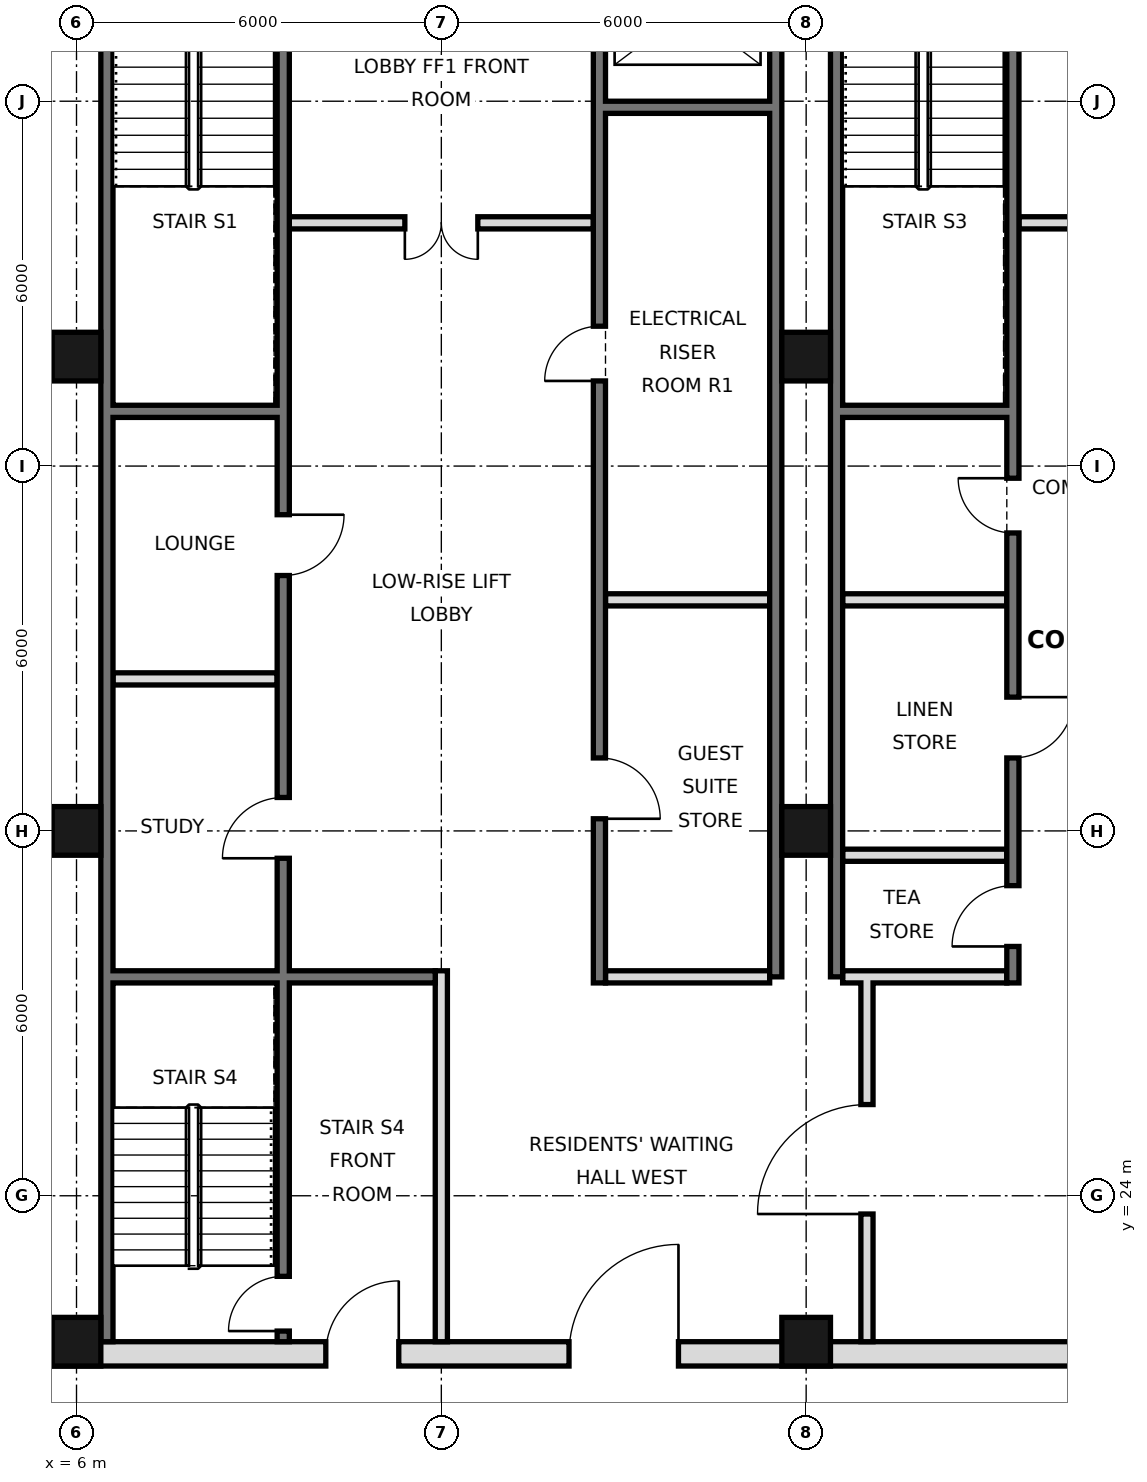
"""IFC4 building model, lengths in metres.
Left out: names, types, materials, properties, quantities, classifications, styles, units other than length and angle.
Written with IfcOpenShell. Run it as: python <this file> out.ifc"""

import sys

from ifc_helpers import new_model, si_unit, direction, frame, frame_2d, origin, origin_2d, place, context, subcontext, project, spatial, rectangle, hollow_rectangle, extrude, element, fill, save


model = new_model("IFC4")
c1 = context("Model", 3, precision=1e-05, world=origin(), true_north=direction((0.0, 1.0)))
c2 = subcontext(c1, "Body", "Model", "MODEL_VIEW")
j1 = project(units=[si_unit("LENGTHUNIT", "METRE"), si_unit("PLANEANGLEUNIT", "RADIAN")], contexts=[c1])
p1 = place(None, origin())
s1 = spatial("IfcSite", under=j1, at=p1, CompositionType="ELEMENT")
p2 = place(p1, origin())
s2 = spatial("IfcBuilding", under=s1, at=p2, CompositionType="ELEMENT")
p3 = place(p2, frame((0.0, 0.0, 319.6)))
s3 = spatial("IfcBuildingStorey", under=s2, at=p3, CompositionType="ELEMENT", Elevation=319.6)
for number, where, z_axis, x_axis in (
    (1, (6.0, 21.6, 0.0), (0.0, 0.0, 1.0), (1.0, 0.0, 0.0)),
    (2, (6.0, 30.0, 0.0), (0.0, 0.0, 1.0), (1.0, 0.0, 0.0)),
    (3, (6.0, 37.8, 0.0), (0.0, 0.0, 1.0), (1.0, 0.0, 0.0)),
    (4, (18.0, 21.6, 0.0), (0.0, 0.0, 1.0), (1.0, 0.0, 0.0)),
    (5, (18.0, 30.0, 0.0), (0.0, 0.0, 1.0), (1.0, 0.0, 0.0)),
    (6, (18.0, 37.8, 0.0), (0.0, 0.0, 1.0), (1.0, 0.0, 0.0)),
):
    element("IfcColumn", number, at=place(p3, frame(where, z_axis=z_axis, x_axis=x_axis)), inside=s3, PredefinedType="COLUMN", context=c2, shape_type="SweptSolid", body=[
        extrude(hollow_rectangle(XDim=0.8, YDim=0.8, WallThickness=0.025, at=origin_2d()), origin(), (0.0, 0.0, 1.0), 3.6),
    ])
p4 = place(p3, frame((6.5, 21.6, 0.0), z_axis=(0.0, 0.0, 1.0), x_axis=(0.0, 1.0, 0.0)))
e7 = element("IfcWall", 7, at=p4, inside=s3, PredefinedType="SOLIDWALL", context=c2, shape_type="SweptSolid", body=[
    extrude(rectangle(XDim=23.5, YDim=0.2, at=frame_2d((11.75, 0.0))), origin(), (0.0, 0.0, 1.0), 3.42),
])
for number, where, z_axis, x_axis in (
    (8, (17.5, 27.6, 0.0), (0.0, 0.0, 1.0), (0.0, 1.0, 0.0)),
    (9, (18.5, 27.6, 0.0), (0.0, 0.0, 1.0), (0.0, 1.0, 0.0)),
):
    element("IfcWall", number, at=place(p3, frame(where, z_axis=z_axis, x_axis=x_axis)), inside=s3, PredefinedType="SOLIDWALL", context=c2, shape_type="SweptSolid", body=[
        extrude(rectangle(XDim=17.5, YDim=0.2, at=frame_2d((8.75, 0.0))), origin(), (0.0, 0.0, 1.0), 3.42),
    ])
p5 = place(p3, frame((5.6, 21.4, 0.0), z_axis=(0.0, 0.0, 1.0), x_axis=(1.0, 0.0, 0.0)))
e10 = element("IfcWall", 10, at=p5, inside=s3, PredefinedType="SOLIDWALL", context=c2, shape_type="SweptSolid", body=[
    extrude(rectangle(XDim=36.8, YDim=0.4, at=frame_2d((18.4, 0.0))), origin(), (0.0, 0.0, 1.0), 3.42),
])
p6 = place(p5, frame((8.5, 0.0, 0.0)))
e11 = element("IfcOpeningElement", 11, at=p6, cuts=e10, PredefinedType="OPENING", context=c2, shape_type="SweptSolid", body=[
    extrude(rectangle(XDim=1.8, YDim=2.1, at=frame_2d((0.9, 1.05))), frame((0.0, 0.21, 0.0), z_axis=(0.0, -1.0, 0.0), x_axis=(1.0, 0.0, 0.0)), (0.0, 0.0, 1.0), 0.42),
])
p7 = place(p5, frame((17.5, 0.0, 0.0)))
e12 = element("IfcOpeningElement", 12, at=p7, cuts=e10, PredefinedType="OPENING", context=c2, shape_type="SweptSolid", body=[
    extrude(rectangle(XDim=1.8, YDim=2.1, at=frame_2d((0.9, 1.05))), frame((0.0, 0.21, 0.0), z_axis=(0.0, -1.0, 0.0), x_axis=(1.0, 0.0, 0.0)), (0.0, 0.0, 1.0), 0.42),
])
p8 = place(p5, frame((26.5, 0.0, 0.0)))
e13 = element("IfcOpeningElement", 13, at=p8, cuts=e10, PredefinedType="OPENING", context=c2, shape_type="SweptSolid", body=[
    extrude(rectangle(XDim=1.8, YDim=2.1, at=frame_2d((0.9, 1.05))), frame((0.0, 0.21, 0.0), z_axis=(0.0, -1.0, 0.0), x_axis=(1.0, 0.0, 0.0)), (0.0, 0.0, 1.0), 0.42),
])
p9 = place(p5, frame((4.5, 0.0, 0.0)))
e14 = element("IfcOpeningElement", 14, at=p9, cuts=e10, PredefinedType="OPENING", context=c2, shape_type="SweptSolid", body=[
    extrude(rectangle(XDim=1.2, YDim=2.1, at=frame_2d((0.6, 1.05))), frame((0.0, 0.21, 0.0), z_axis=(0.0, -1.0, 0.0), x_axis=(1.0, 0.0, 0.0)), (0.0, 0.0, 1.0), 0.42),
])
p10 = place(p5, frame((31.1, 0.0, 0.0)))
e15 = element("IfcOpeningElement", 15, at=p10, cuts=e10, PredefinedType="OPENING", context=c2, shape_type="SweptSolid", body=[
    extrude(rectangle(XDim=1.2, YDim=2.1, at=frame_2d((0.6, 1.05))), frame((0.0, 0.21, 0.0), z_axis=(0.0, -1.0, 0.0), x_axis=(1.0, 0.0, 0.0)), (0.0, 0.0, 1.0), 0.42),
])
p11 = place(p3, frame((19.0, 21.6, 0.0), z_axis=(0.0, 0.0, 1.0), x_axis=(0.0, 1.0, 0.0)))
e16 = element("IfcWall", 16, at=p11, inside=s3, PredefinedType="PARTITIONING", context=c2, shape_type="SweptSolid", body=[
    extrude(rectangle(XDim=6.0, YDim=0.2, at=frame_2d((3.0, 0.0))), origin(), (0.0, 0.0, 1.0), 3.42),
])
p12 = place(p11, frame((2.1, 0.0, 0.0)))
e17 = element("IfcOpeningElement", 17, at=p12, cuts=e16, PredefinedType="OPENING", context=c2, shape_type="SweptSolid", body=[
    extrude(rectangle(XDim=1.8, YDim=2.1, at=frame_2d((0.9, 1.05))), frame((0.0, 0.11, 0.0), z_axis=(0.0, -1.0, 0.0), x_axis=(1.0, 0.0, 0.0)), (0.0, 0.0, 1.0), 0.22),
])
p13 = place(p3, frame((12.0, 21.6, 0.0), z_axis=(0.0, 0.0, 1.0), x_axis=(0.0, 1.0, 0.0)))
e18 = element("IfcWall", 18, at=p13, inside=s3, PredefinedType="PARTITIONING", context=c2, shape_type="SweptSolid", body=[
    extrude(rectangle(XDim=6.1, YDim=0.2, at=frame_2d((3.05, 0.0))), origin(), (0.0, 0.0, 1.0), 3.42),
])
p14 = place(p3, frame((14.6, 27.5, 0.0), z_axis=(0.0, 0.0, 1.0), x_axis=(0.0, 1.0, 0.0)))
e19 = element("IfcWall", 19, at=p14, inside=s3, PredefinedType="SOLIDWALL", context=c2, shape_type="SweptSolid", body=[
    extrude(rectangle(XDim=17.5, YDim=0.2, at=frame_2d((8.75, 0.0))), origin(), (0.0, 0.0, 1.0), 3.42),
])
p15 = place(p14, frame((15.4, 0.0, 0.0)))
e20 = element("IfcOpeningElement", 20, at=p15, cuts=e19, PredefinedType="OPENING", context=c2, shape_type="SweptSolid", body=[
    extrude(rectangle(XDim=1.1, YDim=2.1, at=frame_2d((0.55, 1.05))), frame((0.0, 0.11, 0.0), z_axis=(0.0, -1.0, 0.0), x_axis=(1.0, 0.0, 0.0)), (0.0, 0.0, 1.0), 0.22),
])
p16 = place(p14, frame((2.7, 0.0, 0.0)))
e21 = element("IfcOpeningElement", 21, at=p16, cuts=e19, PredefinedType="OPENING", context=c2, shape_type="SweptSolid", body=[
    extrude(rectangle(XDim=1.0, YDim=2.1, at=frame_2d((0.5, 1.05))), frame((0.0, 0.11, 0.0), z_axis=(0.0, -1.0, 0.0), x_axis=(1.0, 0.0, 0.0)), (0.0, 0.0, 1.0), 0.22),
])
p17 = place(p14, frame((9.9, 0.0, 0.0)))
e22 = element("IfcOpeningElement", 22, at=p17, cuts=e19, PredefinedType="OPENING", context=c2, shape_type="SweptSolid", body=[
    extrude(rectangle(XDim=0.9, YDim=2.1, at=frame_2d((0.45, 1.05))), frame((0.0, 0.11, 0.0), z_axis=(0.0, -1.0, 0.0), x_axis=(1.0, 0.0, 0.0)), (0.0, 0.0, 1.0), 0.22),
])
p18 = place(p3, frame((21.4, 27.5, 0.0), z_axis=(0.0, 0.0, 1.0), x_axis=(0.0, 1.0, 0.0)))
e23 = element("IfcWall", 23, at=p18, inside=s3, PredefinedType="SOLIDWALL", context=c2, shape_type="SweptSolid", body=[
    extrude(rectangle(XDim=17.5, YDim=0.2, at=frame_2d((8.75, 0.0))), origin(), (0.0, 0.0, 1.0), 3.42),
])
p19 = place(p18, frame((0.6, 0.0, 0.0)))
e24 = element("IfcOpeningElement", 24, at=p19, cuts=e23, PredefinedType="OPENING", context=c2, shape_type="SweptSolid", body=[
    extrude(rectangle(XDim=1.0, YDim=2.1, at=frame_2d((0.5, 1.05))), frame((0.0, 0.11, 0.0), z_axis=(0.0, -1.0, 0.0), x_axis=(1.0, 0.0, 0.0)), (0.0, 0.0, 1.0), 0.22),
])
p20 = place(p18, frame((3.7, 0.0, 0.0)))
e25 = element("IfcOpeningElement", 25, at=p20, cuts=e23, PredefinedType="OPENING", context=c2, shape_type="SweptSolid", body=[
    extrude(rectangle(XDim=1.0, YDim=2.1, at=frame_2d((0.5, 1.05))), frame((0.0, 0.11, 0.0), z_axis=(0.0, -1.0, 0.0), x_axis=(1.0, 0.0, 0.0)), (0.0, 0.0, 1.0), 0.22),
])
p21 = place(p18, frame((16.2, 0.0, 0.0)))
e26 = element("IfcOpeningElement", 26, at=p21, cuts=e23, PredefinedType="OPENING", context=c2, shape_type="SweptSolid", body=[
    extrude(rectangle(XDim=1.0, YDim=2.1, at=frame_2d((0.5, 1.05))), frame((0.0, 0.11, 0.0), z_axis=(0.0, -1.0, 0.0), x_axis=(1.0, 0.0, 0.0)), (0.0, 0.0, 1.0), 0.22),
])
p22 = place(p18, frame((7.4, 0.0, 0.0)))
e27 = element("IfcOpeningElement", 27, at=p22, cuts=e23, PredefinedType="OPENING", context=c2, shape_type="SweptSolid", body=[
    extrude(rectangle(XDim=0.9, YDim=2.1, at=frame_2d((0.45, 1.05))), frame((0.0, 0.11, 0.0), z_axis=(0.0, -1.0, 0.0), x_axis=(1.0, 0.0, 0.0)), (0.0, 0.0, 1.0), 0.22),
])
p23 = place(p3, frame((9.4, 21.6, 0.0), z_axis=(0.0, 0.0, 1.0), x_axis=(0.0, 1.0, 0.0)))
e28 = element("IfcWall", 28, at=p23, inside=s3, PredefinedType="SOLIDWALL", context=c2, shape_type="SweptSolid", body=[
    extrude(rectangle(XDim=23.4, YDim=0.2, at=frame_2d((11.7, 0.0))), origin(), (0.0, 0.0, 1.0), 3.42),
])
p24 = place(p23, frame((7.95, 0.0, 0.0)))
e29 = element("IfcOpeningElement", 29, at=p24, cuts=e28, PredefinedType="OPENING", context=c2, shape_type="SweptSolid", body=[
    extrude(rectangle(XDim=1.0, YDim=2.1, at=frame_2d((0.5, 1.05))), frame((0.0, 0.11, 0.0), z_axis=(0.0, -1.0, 0.0), x_axis=(1.0, 0.0, 0.0)), (0.0, 0.0, 1.0), 0.22),
])
p25 = place(p23, frame((12.6, 0.0, 0.0)))
e30 = element("IfcOpeningElement", 30, at=p25, cuts=e28, PredefinedType="OPENING", context=c2, shape_type="SweptSolid", body=[
    extrude(rectangle(XDim=1.0, YDim=2.1, at=frame_2d((0.5, 1.05))), frame((0.0, 0.11, 0.0), z_axis=(0.0, -1.0, 0.0), x_axis=(1.0, 0.0, 0.0)), (0.0, 0.0, 1.0), 0.22),
])
p26 = place(p23, frame((22.1, 0.0, 0.0)))
e31 = element("IfcOpeningElement", 31, at=p26, cuts=e28, PredefinedType="OPENING", context=c2, shape_type="SweptSolid", body=[
    extrude(rectangle(XDim=1.0, YDim=2.1, at=frame_2d((0.5, 1.05))), frame((0.0, 0.11, 0.0), z_axis=(0.0, -1.0, 0.0), x_axis=(1.0, 0.0, 0.0)), (0.0, 0.0, 1.0), 0.22),
])
p27 = place(p23, frame((0.175, 0.0, 0.0)))
e32 = element("IfcOpeningElement", 32, at=p27, cuts=e28, PredefinedType="OPENING", context=c2, shape_type="SweptSolid", body=[
    extrude(rectangle(XDim=0.9, YDim=2.1, at=frame_2d((0.45, 1.05))), frame((0.0, 0.11, 0.0), z_axis=(0.0, -1.0, 0.0), x_axis=(1.0, 0.0, 0.0)), (0.0, 0.0, 1.0), 0.22),
])
for number, where, z_axis, x_axis in (
    (33, (14.7, 27.6, 0.0), (0.0, 0.0, 1.0), (1.0, 0.0, 0.0)),
    (34, (18.6, 27.6, 0.0), (0.0, 0.0, 1.0), (1.0, 0.0, 0.0)),
):
    element("IfcWall", number, at=place(p3, frame(where, z_axis=z_axis, x_axis=x_axis)), inside=s3, PredefinedType="PARTITIONING", context=c2, shape_type="SweptSolid", body=[
        extrude(rectangle(XDim=2.7, YDim=0.2, at=frame_2d((1.35, 0.0))), origin(), (0.0, 0.0, 1.0), 3.42),
    ])
p28 = place(p3, frame((6.6, 27.6, 0.0), z_axis=(0.0, 0.0, 1.0), x_axis=(1.0, 0.0, 0.0)))
e35 = element("IfcWall", 35, at=p28, inside=s3, PredefinedType="SOLIDWALL", context=c2, shape_type="SweptSolid", body=[
    extrude(rectangle(XDim=5.3, YDim=0.2, at=frame_2d((2.65, 0.0))), origin(), (0.0, 0.0, 1.0), 3.42),
])
for number, where, z_axis, x_axis in (
    (36, (18.6, 29.6, 0.0), (0.0, 0.0, 1.0), (1.0, 0.0, 0.0)),
    (37, (6.6, 32.5, 0.0), (0.0, 0.0, 1.0), (1.0, 0.0, 0.0)),
):
    element("IfcWall", number, at=place(p3, frame(where, z_axis=z_axis, x_axis=x_axis)), inside=s3, PredefinedType="PARTITIONING", context=c2, shape_type="SweptSolid", body=[
        extrude(rectangle(XDim=2.7, YDim=0.2, at=frame_2d((1.35, 0.0))), origin(), (0.0, 0.0, 1.0), 3.42),
    ])
for number, where, z_axis, x_axis in (
    (38, (14.7, 33.8, 0.0), (0.0, 0.0, 1.0), (1.0, 0.0, 0.0)),
    (39, (18.6, 33.8, 0.0), (0.0, 0.0, 1.0), (1.0, 0.0, 0.0)),
    (40, (18.6, 36.9, 0.0), (0.0, 0.0, 1.0), (1.0, 0.0, 0.0)),
    (41, (6.6, 36.9, 0.0), (0.0, 0.0, 1.0), (1.0, 0.0, 0.0)),
):
    element("IfcWall", number, at=place(p3, frame(where, z_axis=z_axis, x_axis=x_axis)), inside=s3, PredefinedType="SOLIDWALL", context=c2, shape_type="SweptSolid", body=[
        extrude(rectangle(XDim=2.7, YDim=0.2, at=frame_2d((1.35, 0.0))), origin(), (0.0, 0.0, 1.0), 3.42),
    ])
p29 = place(p3, frame((21.5, 40.0, 0.0), z_axis=(0.0, 0.0, 1.0), x_axis=(1.0, 0.0, 0.0)))
e42 = element("IfcWall", 42, at=p29, inside=s3, PredefinedType="PARTITIONING", context=c2, shape_type="SweptSolid", body=[
    extrude(rectangle(XDim=5.0, YDim=0.2, at=frame_2d((2.5, 0.0))), origin(), (0.0, 0.0, 1.0), 3.42),
])
p30 = place(p29, frame((1.9, 0.0, 0.0)))
e43 = element("IfcOpeningElement", 43, at=p30, cuts=e42, PredefinedType="OPENING", context=c2, shape_type="SweptSolid", body=[
    extrude(rectangle(XDim=1.2, YDim=2.1, at=frame_2d((0.6, 1.05))), frame((0.0, 0.11, 0.0), z_axis=(0.0, -1.0, 0.0), x_axis=(1.0, 0.0, 0.0)), (0.0, 0.0, 1.0), 0.22),
])
p31 = place(p3, frame((9.5, 40.0, 0.0), z_axis=(0.0, 0.0, 1.0), x_axis=(1.0, 0.0, 0.0)))
e44 = element("IfcWall", 44, at=p31, inside=s3, PredefinedType="PARTITIONING", context=c2, shape_type="SweptSolid", body=[
    extrude(rectangle(XDim=5.0, YDim=0.2, at=frame_2d((2.5, 0.0))), origin(), (0.0, 0.0, 1.0), 3.42),
])
p32 = place(p31, frame((1.9, 0.0, 0.0)))
e45 = element("IfcOpeningElement", 45, at=p32, cuts=e44, PredefinedType="OPENING", context=c2, shape_type="SweptSolid", body=[
    extrude(rectangle(XDim=1.2, YDim=2.1, at=frame_2d((0.6, 1.05))), frame((0.0, 0.11, 0.0), z_axis=(0.0, -1.0, 0.0), x_axis=(1.0, 0.0, 0.0)), (0.0, 0.0, 1.0), 0.22),
])
p33 = place(p3, frame((14.7, 41.9, 0.0), z_axis=(0.0, 0.0, 1.0), x_axis=(1.0, 0.0, 0.0)))
e46 = element("IfcWall", 46, at=p33, inside=s3, PredefinedType="SOLIDWALL", context=c2, shape_type="SweptSolid", body=[
    extrude(rectangle(XDim=2.7, YDim=0.2, at=frame_2d((1.35, 0.0))), origin(), (0.0, 0.0, 1.0), 3.42),
])
p34 = place(p6, frame((1.8, 0.0, 0.0), z_axis=(0.0, 0.0, 1.0), x_axis=(-1.0, 0.0, 0.0)))
e47 = element("IfcDoor", 47, at=p34, inside=s3, OperationType="SINGLE_SWING_LEFT", PredefinedType="DOOR", context=c2, shape_type="SweptSolid", body=[
    extrude(rectangle(XDim=1.8, YDim=2.1, at=frame_2d((0.9, 1.05))), frame((0.0, 0.025, 0.0), z_axis=(0.0, -1.0, 0.0), x_axis=(1.0, 0.0, 0.0)), (0.0, 0.0, 1.0), 0.05),
])
fill(e11, e47)
p35 = place(p12, origin())
e48 = element("IfcDoor", 48, at=p35, inside=s3, OperationType="SINGLE_SWING_LEFT", PredefinedType="DOOR", context=c2, shape_type="SweptSolid", body=[
    extrude(rectangle(XDim=1.8, YDim=2.1, at=frame_2d((0.9, 1.05))), frame((0.0, 0.025, 0.0), z_axis=(0.0, -1.0, 0.0), x_axis=(1.0, 0.0, 0.0)), (0.0, 0.0, 1.0), 0.05),
])
fill(e17, e48)
p36 = place(p9, frame((1.2, 0.0, 0.0), z_axis=(0.0, 0.0, 1.0), x_axis=(-1.0, 0.0, 0.0)))
e49 = element("IfcDoor", 49, at=p36, inside=s3, OperationType="SINGLE_SWING_LEFT", PredefinedType="DOOR", context=c2, shape_type="SweptSolid", body=[
    extrude(rectangle(XDim=1.2, YDim=2.1, at=frame_2d((0.6, 1.05))), frame((0.0, 0.025, 0.0), z_axis=(0.0, -1.0, 0.0), x_axis=(1.0, 0.0, 0.0)), (0.0, 0.0, 1.0), 0.05),
])
fill(e14, e49)
p37 = place(p32, frame((1.2, 0.0, 0.0), z_axis=(0.0, 0.0, 1.0), x_axis=(-1.0, 0.0, 0.0)))
e50 = element("IfcDoor", 50, at=p37, inside=s3, OperationType="DOUBLE_DOOR_SINGLE_SWING", PredefinedType="DOOR", context=c2, shape_type="SweptSolid", body=[
    extrude(rectangle(XDim=1.2, YDim=2.1, at=frame_2d((0.6, 1.05))), frame((0.0, 0.025, 0.0), z_axis=(0.0, -1.0, 0.0), x_axis=(1.0, 0.0, 0.0)), (0.0, 0.0, 1.0), 0.05),
])
fill(e45, e50)
p38 = place(p19, origin())
e51 = element("IfcDoor", 51, at=p38, inside=s3, OperationType="SINGLE_SWING_LEFT", PredefinedType="DOOR", context=c2, shape_type="SweptSolid", body=[
    extrude(rectangle(XDim=1.0, YDim=2.1, at=frame_2d((0.5, 1.05))), frame((0.0, 0.025, 0.0), z_axis=(0.0, -1.0, 0.0), x_axis=(1.0, 0.0, 0.0)), (0.0, 0.0, 1.0), 0.05),
])
fill(e24, e51)
p39 = place(p20, origin())
e52 = element("IfcDoor", 52, at=p39, inside=s3, OperationType="SINGLE_SWING_RIGHT", PredefinedType="DOOR", context=c2, shape_type="SweptSolid", body=[
    extrude(rectangle(XDim=1.0, YDim=2.1, at=frame_2d((0.5, 1.05))), frame((0.0, 0.025, 0.0), z_axis=(0.0, -1.0, 0.0), x_axis=(1.0, 0.0, 0.0)), (0.0, 0.0, 1.0), 0.05),
])
fill(e25, e52)
p40 = place(p16, frame((1.0, 0.0, 0.0), z_axis=(0.0, 0.0, 1.0), x_axis=(-1.0, 0.0, 0.0)))
e53 = element("IfcDoor", 53, at=p40, inside=s3, OperationType="SINGLE_SWING_RIGHT", PredefinedType="DOOR", context=c2, shape_type="SweptSolid", body=[
    extrude(rectangle(XDim=1.0, YDim=2.1, at=frame_2d((0.5, 1.05))), frame((0.0, 0.025, 0.0), z_axis=(0.0, -1.0, 0.0), x_axis=(1.0, 0.0, 0.0)), (0.0, 0.0, 1.0), 0.05),
])
fill(e21, e53)
p41 = place(p24, origin())
e54 = element("IfcDoor", 54, at=p41, inside=s3, OperationType="SINGLE_SWING_LEFT", PredefinedType="DOOR", context=c2, shape_type="SweptSolid", body=[
    extrude(rectangle(XDim=1.0, YDim=2.1, at=frame_2d((0.5, 1.05))), frame((0.0, 0.025, 0.0), z_axis=(0.0, -1.0, 0.0), x_axis=(1.0, 0.0, 0.0)), (0.0, 0.0, 1.0), 0.05),
])
fill(e29, e54)
p42 = place(p25, origin())
e55 = element("IfcDoor", 55, at=p42, inside=s3, OperationType="SINGLE_SWING_RIGHT", PredefinedType="DOOR", context=c2, shape_type="SweptSolid", body=[
    extrude(rectangle(XDim=1.0, YDim=2.1, at=frame_2d((0.5, 1.05))), frame((0.0, 0.025, 0.0), z_axis=(0.0, -1.0, 0.0), x_axis=(1.0, 0.0, 0.0)), (0.0, 0.0, 1.0), 0.05),
])
fill(e30, e55)
p43 = place(p27, origin())
e56 = element("IfcDoor", 56, at=p43, inside=s3, OperationType="SINGLE_SWING_LEFT", PredefinedType="DOOR", context=c2, shape_type="SweptSolid", body=[
    extrude(rectangle(XDim=0.9, YDim=2.1, at=frame_2d((0.45, 1.05))), frame((0.0, 0.025, 0.0), z_axis=(0.0, -1.0, 0.0), x_axis=(1.0, 0.0, 0.0)), (0.0, 0.0, 1.0), 0.05),
])
fill(e32, e56)
p44 = place(p17, origin())
e57 = element("IfcDoor", 57, at=p44, inside=s3, OperationType="SINGLE_SWING_LEFT", PredefinedType="DOOR", context=c2, shape_type="SweptSolid", body=[
    extrude(rectangle(XDim=0.9, YDim=2.1, at=frame_2d((0.45, 1.05))), frame((0.0, 0.025, 0.0), z_axis=(0.0, -1.0, 0.0), x_axis=(1.0, 0.0, 0.0)), (0.0, 0.0, 1.0), 0.05),
])
fill(e22, e57)
p45 = place(p22, frame((0.9, 0.0, 0.0), z_axis=(0.0, 0.0, 1.0), x_axis=(-1.0, 0.0, 0.0)))
e58 = element("IfcDoor", 58, at=p45, inside=s3, OperationType="SINGLE_SWING_LEFT", PredefinedType="DOOR", context=c2, shape_type="SweptSolid", body=[
    extrude(rectangle(XDim=0.9, YDim=2.1, at=frame_2d((0.45, 1.05))), frame((0.0, 0.025, 0.0), z_axis=(0.0, -1.0, 0.0), x_axis=(1.0, 0.0, 0.0)), (0.0, 0.0, 1.0), 0.05),
])
fill(e27, e58)
save(model, sys.argv[1])
